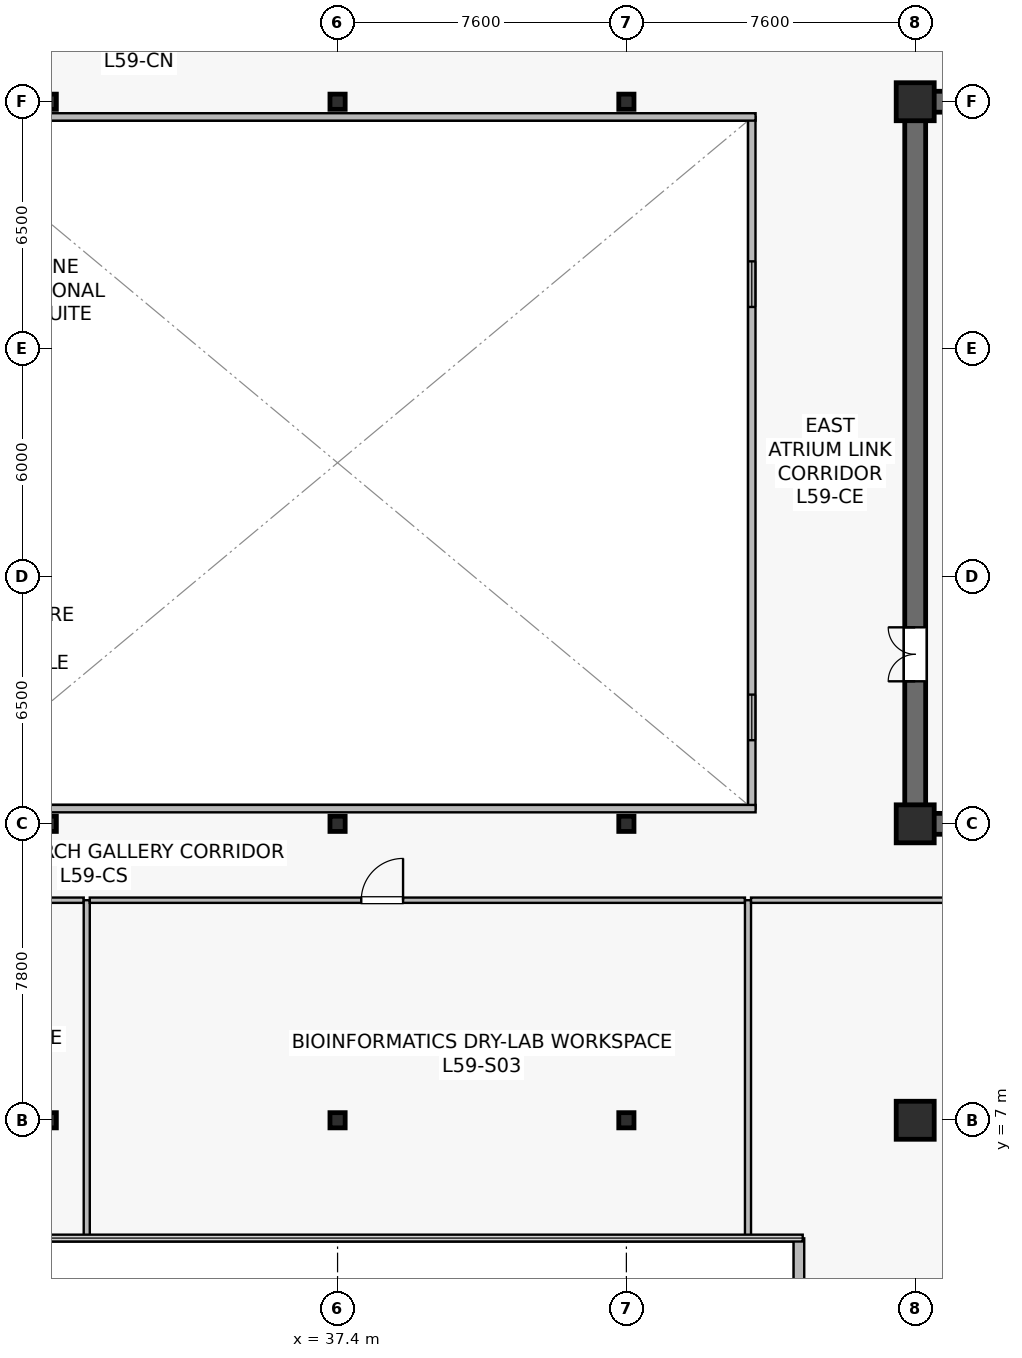
"""IFC4 building model, lengths in metres.
Left out: names, types, materials, properties, quantities, classifications, styles, units other than length and angle.
Written with IfcOpenShell. Run it as: python <this file> out.ifc"""

import sys

from ifc_helpers import new_model, si_unit, direction, frame, frame_2d, origin, origin_2d, place, context, subcontext, project, spatial, rectangle, hollow_rectangle, extrude, source, transform, mapped, element, fill, save


model = new_model("IFC4")
c1 = context("Model", 3, precision=1e-05, world=origin(), true_north=direction((0.0, 1.0)))
c2 = subcontext(c1, "Body", "Model", "MODEL_VIEW")
j1 = project(units=[si_unit("LENGTHUNIT", "METRE"), si_unit("PLANEANGLEUNIT", "RADIAN")], contexts=[c1])
p1 = place(None, origin())
s1 = spatial("IfcSite", under=j1, at=p1, CompositionType="ELEMENT")
p2 = place(p1, origin())
s2 = spatial("IfcBuilding", under=s1, at=p2, CompositionType="ELEMENT")
p3 = place(p2, frame((0.0, 0.0, 246.5)))
s3 = spatial("IfcBuildingStorey", under=s2, at=p3, CompositionType="ELEMENT", Elevation=246.5)
p4 = place(p3, frame((52.325, 14.8, 0.0), z_axis=(0.0, 0.0, 1.0), x_axis=(1.0, 0.0, 0.0)))
e1 = element("IfcWall", 1, at=p4, inside=s3, PredefinedType="SHEAR", context=c2, shape_type="SweptSolid", body=[
    extrude(rectangle(XDim=15.35, YDim=0.55, at=frame_2d((7.675, 0.0))), origin(), (0.0, 0.0, 1.0), 3.8),
])
p5 = place(p3, frame((52.325, 33.8, 0.0), z_axis=(0.0, 0.0, 1.0), x_axis=(1.0, 0.0, 0.0)))
e2 = element("IfcWall", 2, at=p5, inside=s3, PredefinedType="SHEAR", context=c2, shape_type="SweptSolid", body=[
    extrude(rectangle(XDim=15.35, YDim=0.55, at=frame_2d((7.675, 0.0))), origin(), (0.0, 0.0, 1.0), 3.8),
])
p6 = place(p5, frame((6.075, 0.0, 0.0)))
e3 = element("IfcOpeningElement", 3, at=p6, cuts=e2, PredefinedType="OPENING", context=c2, shape_type="SweptSolid", body=[
    extrude(rectangle(XDim=0.95, YDim=2.15, at=frame_2d((0.475, 1.075))), frame((0.0, 0.285, 0.0), z_axis=(0.0, -1.0, 0.0), x_axis=(1.0, 0.0, 0.0)), (0.0, 0.0, 1.0), 0.57),
])
p7 = place(p5, frame((2.535, 0.0, 0.0)))
e4 = element("IfcOpeningElement", 4, at=p7, cuts=e2, PredefinedType="OPENING", context=c2, shape_type="SweptSolid", body=[
    extrude(rectangle(XDim=0.95, YDim=2.15, at=frame_2d((0.475, 1.075))), frame((0.0, 0.285, 0.0), z_axis=(0.0, -1.0, 0.0), x_axis=(1.0, 0.0, 0.0)), (0.0, 0.0, 1.0), 0.57),
])
p8 = place(p3, frame((52.6, 15.075, 0.0), z_axis=(0.0, 0.0, 1.0), x_axis=(0.0, 1.0, 0.0)))
e5 = element("IfcWall", 5, at=p8, inside=s3, PredefinedType="SHEAR", context=c2, shape_type="SweptSolid", body=[
    extrude(rectangle(XDim=18.45, YDim=0.55, at=frame_2d((9.225, 0.0))), origin(), (0.0, 0.0, 1.0), 3.8),
])
p9 = place(p8, frame((3.475, 0.0, 0.0)))
e6 = element("IfcOpeningElement", 6, at=p9, cuts=e5, PredefinedType="OPENING", context=c2, shape_type="SweptSolid", body=[
    extrude(rectangle(XDim=1.42, YDim=2.2, at=frame_2d((0.71, 1.1))), frame((0.0, 0.285, 0.0), z_axis=(0.0, -1.0, 0.0), x_axis=(1.0, 0.0, 0.0)), (0.0, 0.0, 1.0), 0.57),
])
m1 = source(origin(), c2, "Body", "SweptSolid", [
    extrude(rectangle(XDim=1.0, YDim=1.0, at=origin_2d()), origin(), (0.0, 0.0, 1.0), 4.1),
])
for number, where, z_axis, x_axis in (
    (7, (52.6, 7.0, 0.0), (0.0, 0.0, 1.0), (1.0, 0.0, 0.0)),
    (8, (52.6, 14.8, 0.0), (0.0, 0.0, 1.0), (1.0, 0.0, 0.0)),
    (9, (52.6, 33.8, 0.0), (0.0, 0.0, 1.0), (1.0, 0.0, 0.0)),
):
    element("IfcColumn", number, at=place(p3, frame(where, z_axis=z_axis, x_axis=x_axis)), inside=s3, PredefinedType="COLUMN", context=c2, shape_type="MappedRepresentation", body=[
        mapped(m1, transform((0.0, 0.0, 0.0), scale=1.0)),
    ])
m2 = source(origin(), c2, "Body", "SweptSolid", [
    extrude(hollow_rectangle(XDim=0.4, YDim=0.4, WallThickness=0.019, at=origin_2d()), origin(), (0.0, 0.0, 1.0), 4.1),
])
for number, where, z_axis, x_axis in (
    (10, (29.8, 7.0, 0.0), (0.0, 0.0, 1.0), (1.0, 0.0, 0.0)),
    (11, (29.8, 14.8, 0.0), (0.0, 0.0, 1.0), (1.0, 0.0, 0.0)),
    (12, (29.8, 33.8, 0.0), (0.0, 0.0, 1.0), (1.0, 0.0, 0.0)),
    (13, (37.4, 7.0, 0.0), (0.0, 0.0, 1.0), (1.0, 0.0, 0.0)),
    (14, (37.4, 14.8, 0.0), (0.0, 0.0, 1.0), (1.0, 0.0, 0.0)),
    (15, (37.4, 33.8, 0.0), (0.0, 0.0, 1.0), (1.0, 0.0, 0.0)),
    (16, (45.0, 7.0, 0.0), (0.0, 0.0, 1.0), (1.0, 0.0, 0.0)),
    (17, (45.0, 14.8, 0.0), (0.0, 0.0, 1.0), (1.0, 0.0, 0.0)),
    (18, (45.0, 33.8, 0.0), (0.0, 0.0, 1.0), (1.0, 0.0, 0.0)),
):
    element("IfcColumn", number, at=place(p3, frame(where, z_axis=z_axis, x_axis=x_axis)), inside=s3, PredefinedType="COLUMN", context=c2, shape_type="MappedRepresentation", body=[
        mapped(m2, transform((0.0, 0.0, 0.0), scale=1.0)),
    ])
p10 = place(p3, frame((49.54, 3.893, 0.0), z_axis=(0.0, 0.0, 1.0), x_axis=(0.0, -1.0, 0.0)))
e19 = element("IfcWall", 19, at=p10, inside=s3, PredefinedType="STANDARD", context=c2, shape_type="SweptSolid", body=[
    extrude(rectangle(XDim=1.293, YDim=0.28, at=frame_2d((0.646, 0.0))), origin(), (0.0, 0.0, 1.0), 3.8),
])
p11 = place(p3, frame((48.3, 15.2, 0.0), z_axis=(0.0, 0.0, 1.0), x_axis=(0.0, 1.0, 0.0)))
e20 = element("IfcWall", 20, at=p11, inside=s3, PredefinedType="SOLIDWALL", context=c2, shape_type="SweptSolid", body=[
    extrude(rectangle(XDim=18.2, YDim=0.195, at=frame_2d((9.1, 0.0))), origin(), (0.0, 0.0, 1.0), 3.8),
])
p12 = place(p11, frame((1.8, 0.0, 0.9)))
e21 = element("IfcOpeningElement", 21, at=p12, cuts=e20, PredefinedType="OPENING", context=c2, shape_type="SweptSolid", body=[
    extrude(rectangle(XDim=1.2, YDim=1.35, at=frame_2d((0.6, 0.675))), frame((0.0, 0.107, 0.0), z_axis=(0.0, -1.0, 0.0), x_axis=(1.0, 0.0, 0.0)), (0.0, 0.0, 1.0), 0.215),
])
p13 = place(p11, frame((13.2, 0.0, 0.9)))
e22 = element("IfcOpeningElement", 22, at=p13, cuts=e20, PredefinedType="OPENING", context=c2, shape_type="SweptSolid", body=[
    extrude(rectangle(XDim=1.2, YDim=1.35, at=frame_2d((0.6, 0.675))), frame((0.0, 0.107, 0.0), z_axis=(0.0, -1.0, 0.0), x_axis=(1.0, 0.0, 0.0)), (0.0, 0.0, 1.0), 0.215),
])
for number, where, z_axis, x_axis in (
    (23, (26.4, 15.2, 0.0), (0.0, 0.0, 1.0), (1.0, 0.0, 0.0)),
    (24, (26.4, 33.4, 0.0), (0.0, 0.0, 1.0), (1.0, 0.0, 0.0)),
):
    element("IfcWall", number, at=place(p3, frame(where, z_axis=z_axis, x_axis=x_axis)), inside=s3, PredefinedType="SOLIDWALL", context=c2, shape_type="SweptSolid", body=[
        extrude(rectangle(XDim=22.0, YDim=0.195, at=frame_2d((11.0, 0.0))), origin(), (0.0, 0.0, 1.0), 3.8),
    ])
p14 = place(p3, frame((15.48, 12.79, 0.0), z_axis=(0.0, 0.0, 1.0), x_axis=(1.0, 0.0, 0.0)))
e25 = element("IfcWall", 25, at=p14, inside=s3, PredefinedType="PARTITIONING", context=c2, shape_type="SweptSolid", body=[
    extrude(rectangle(XDim=15.24, YDim=0.14, at=frame_2d((7.62, 0.0))), origin(), (0.0, 0.0, 1.0), 3.197),
])
p15 = place(p14, frame((7.876, 0.0, 0.0)))
e26 = element("IfcOpeningElement", 26, at=p15, cuts=e25, PredefinedType="OPENING", context=c2, shape_type="SweptSolid", body=[
    extrude(rectangle(XDim=1.1, YDim=2.18, at=frame_2d((0.55, 1.09))), frame((0.0, 0.08, 0.0), z_axis=(0.0, -1.0, 0.0), x_axis=(1.0, 0.0, 0.0)), (0.0, 0.0, 1.0), 0.16),
])
p16 = place(p3, frame((30.8, 3.91, 0.0), z_axis=(0.0, 0.0, 1.0), x_axis=(0.0, 1.0, 0.0)))
e27 = element("IfcWall", 27, at=p16, inside=s3, PredefinedType="PARTITIONING", context=c2, shape_type="SweptSolid", body=[
    extrude(rectangle(XDim=8.88, YDim=0.16, at=frame_2d((4.44, 0.0))), origin(), (0.0, 0.0, 1.0), 3.135),
])
p17 = place(p3, frame((30.88, 12.79, 0.0), z_axis=(0.0, 0.0, 1.0), x_axis=(1.0, 0.0, 0.0)))
e28 = element("IfcWall", 28, at=p17, inside=s3, PredefinedType="PARTITIONING", context=c2, shape_type="SweptSolid", body=[
    extrude(rectangle(XDim=17.24, YDim=0.14, at=frame_2d((8.62, 0.0))), origin(), (0.0, 0.0, 1.0), 3.197),
])
p18 = place(p17, frame((7.144, 0.0, 0.0)))
e29 = element("IfcOpeningElement", 29, at=p18, cuts=e28, PredefinedType="OPENING", context=c2, shape_type="SweptSolid", body=[
    extrude(rectangle(XDim=1.1, YDim=2.18, at=frame_2d((0.55, 1.09))), frame((0.0, 0.08, 0.0), z_axis=(0.0, -1.0, 0.0), x_axis=(1.0, 0.0, 0.0)), (0.0, 0.0, 1.0), 0.16),
])
p19 = place(p3, frame((48.2, 3.91, 0.0), z_axis=(0.0, 0.0, 1.0), x_axis=(0.0, 1.0, 0.0)))
e30 = element("IfcWall", 30, at=p19, inside=s3, PredefinedType="PARTITIONING", context=c2, shape_type="SweptSolid", body=[
    extrude(rectangle(XDim=8.88, YDim=0.16, at=frame_2d((4.44, 0.0))), origin(), (0.0, 0.0, 1.0), 3.135),
])
p20 = place(p3, frame((48.28, 12.79, 0.0), z_axis=(0.0, 0.0, 1.0), x_axis=(1.0, 0.0, 0.0)))
e31 = element("IfcWall", 31, at=p20, inside=s3, PredefinedType="PARTITIONING", context=c2, shape_type="SweptSolid", body=[
    extrude(rectangle(XDim=19.21, YDim=0.14, at=frame_2d((9.605, 0.0))), origin(), (0.0, 0.0, 1.0), 3.197),
])
p21 = place(p20, frame((10.1, 0.0, 0.0)))
e32 = element("IfcOpeningElement", 32, at=p21, cuts=e31, PredefinedType="OPENING", context=c2, shape_type="SweptSolid", body=[
    extrude(rectangle(XDim=1.1, YDim=2.18, at=frame_2d((0.55, 1.09))), frame((0.0, 0.08, 0.0), z_axis=(0.0, -1.0, 0.0), x_axis=(1.0, 0.0, 0.0)), (0.0, 0.0, 1.0), 0.16),
])
m3 = source(origin(), c2, "Body", "SweptSolid", [
    extrude(rectangle(XDim=1.2, YDim=1.35, at=frame_2d((0.6, 0.675))), frame((0.0, 0.03, 0.0), z_axis=(0.0, -1.0, 0.0), x_axis=(1.0, 0.0, 0.0)), (0.0, 0.0, 1.0), 0.06),
])
p22 = place(p12, origin())
e33 = element("IfcWindow", 33, at=p22, inside=s3, PartitioningType="SINGLE_PANEL", PredefinedType="WINDOW", context=c2, shape_type="MappedRepresentation", body=[
    mapped(m3, transform((0.0, 0.0, 0.0), scale=1.0)),
])
fill(e21, e33)
p23 = place(p13, origin())
e34 = element("IfcWindow", 34, at=p23, inside=s3, PartitioningType="SINGLE_PANEL", PredefinedType="WINDOW", context=c2, shape_type="MappedRepresentation", body=[
    mapped(m3, transform((0.0, 0.0, 0.0), scale=1.0)),
])
fill(e22, e34)
m4 = source(origin(), c2, "Body", "SweptSolid", [
    extrude(rectangle(XDim=1.42, YDim=2.2, at=frame_2d((0.71, 1.1))), frame((0.0, 0.025, 0.0), z_axis=(0.0, -1.0, 0.0), x_axis=(1.0, 0.0, 0.0)), (0.0, 0.0, 1.0), 0.05),
])
p24 = place(p9, origin())
e35 = element("IfcDoor", 35, at=p24, inside=s3, OperationType="DOUBLE_DOOR_SINGLE_SWING", PredefinedType="DOOR", context=c2, shape_type="MappedRepresentation", body=[
    mapped(m4, transform((0.0, 0.0, 0.0), scale=1.0)),
])
fill(e6, e35)
m5 = source(origin(), c2, "Body", "SweptSolid", [
    extrude(rectangle(XDim=1.1, YDim=2.18, at=frame_2d((0.55, 1.09))), frame((0.0, 0.025, 0.0), z_axis=(0.0, -1.0, 0.0), x_axis=(1.0, 0.0, 0.0)), (0.0, 0.0, 1.0), 0.05),
])
p25 = place(p18, origin())
e36 = element("IfcDoor", 36, at=p25, inside=s3, OperationType="SINGLE_SWING_RIGHT", PredefinedType="DOOR", context=c2, shape_type="MappedRepresentation", body=[
    mapped(m5, transform((0.0, 0.0, 0.0), scale=1.0)),
])
fill(e29, e36)
save(model, sys.argv[1])
